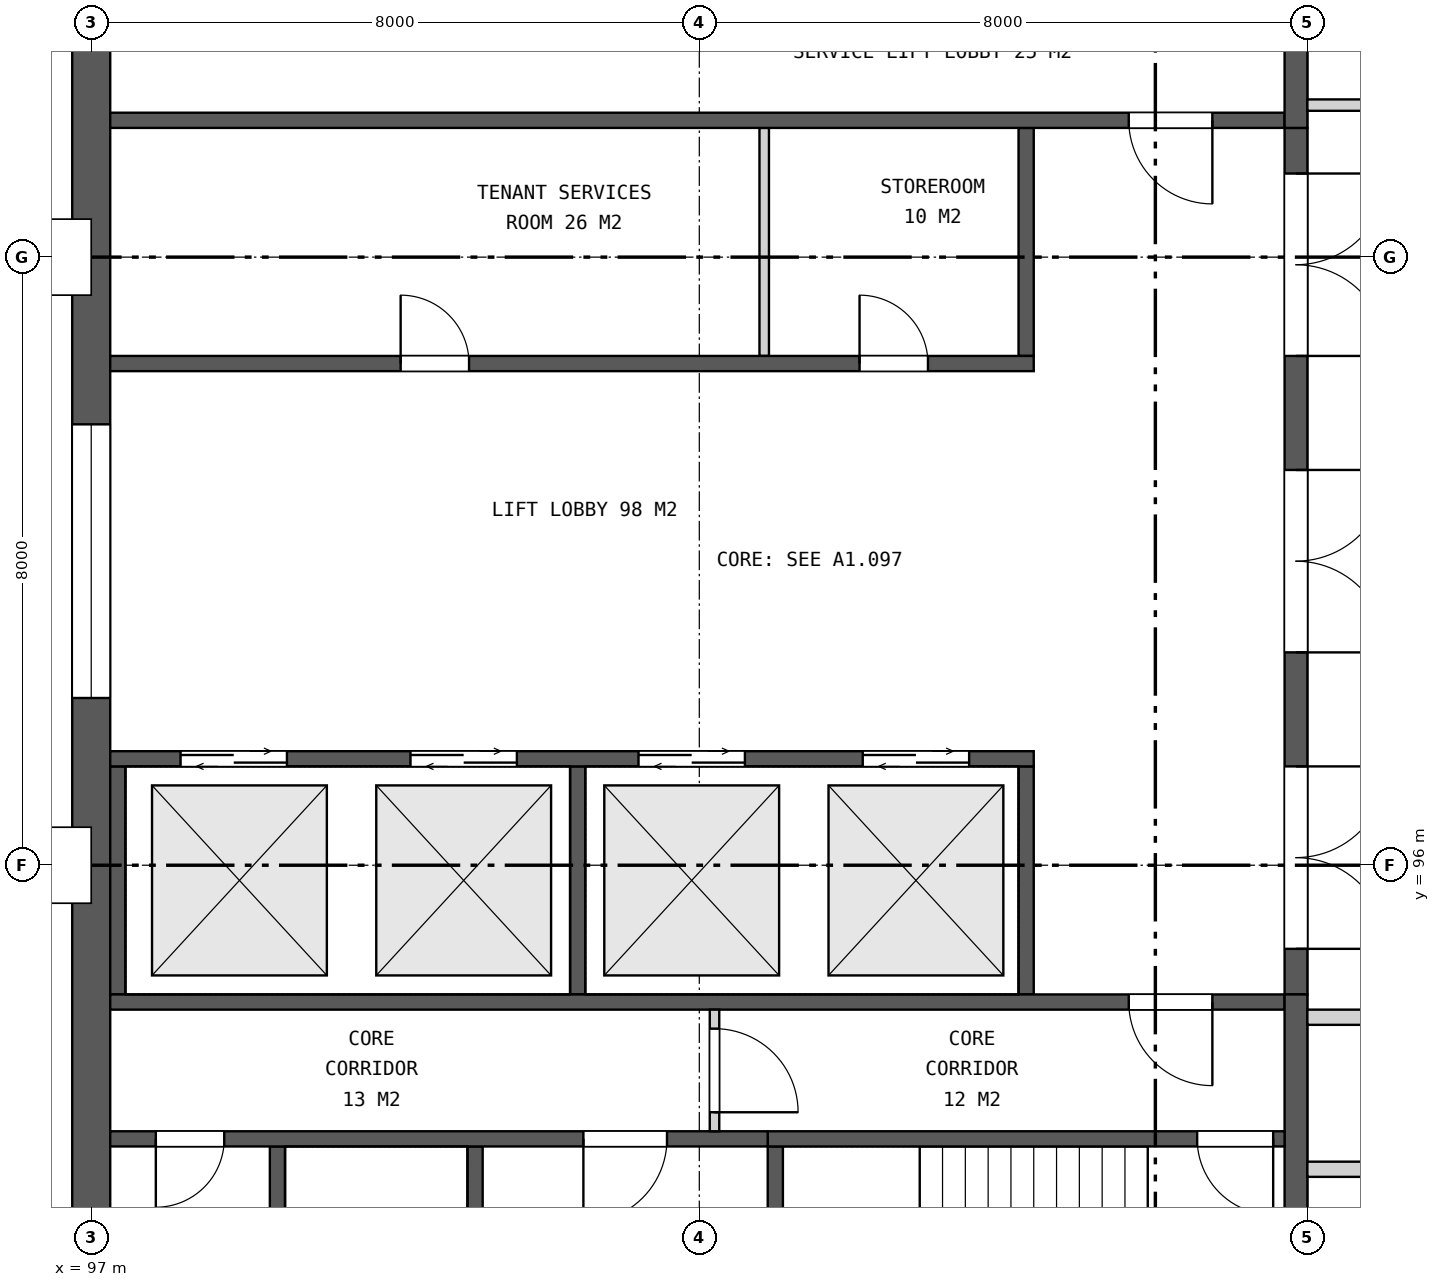
"""IFC4 building model, lengths in metres.
Left out: names, types, materials, properties, quantities, classifications, styles, units other than length and angle.
Written with IfcOpenShell. Run it as: python <this file> out.ifc"""

import sys

from ifc_helpers import new_model, si_unit, direction, frame, frame_2d, origin, place, context, subcontext, project, spatial, rectangle, extrude, element, fill, save


model = new_model("IFC4")
c1 = context("Model", 3, precision=1e-05, world=origin(), true_north=direction((0.0, 1.0)))
c2 = subcontext(c1, "Body", "Model", "MODEL_VIEW")
j1 = project(units=[si_unit("LENGTHUNIT", "METRE"), si_unit("PLANEANGLEUNIT", "RADIAN")], contexts=[c1])
p1 = place(None, origin())
s1 = spatial("IfcSite", under=j1, at=p1, CompositionType="ELEMENT")
p2 = place(p1, origin())
s2 = spatial("IfcBuilding", under=s1, at=p2, CompositionType="ELEMENT")
p3 = place(p2, frame((0.0, 0.0, 245.1)))
s3 = spatial("IfcBuildingStorey", under=s2, at=p3, CompositionType="ELEMENT", Elevation=245.1)
p4 = place(p3, frame((97.0, 111.75, 0.0), z_axis=(0.0, 0.0, 1.0), x_axis=(0.0, -1.0, 0.0)))
e1 = element("IfcWall", 1, at=p4, inside=s3, PredefinedType="SHEAR", context=c2, shape_type="SweptSolid", body=[
    extrude(rectangle(XDim=23.5, YDim=0.5, at=frame_2d((11.75, 0.0))), origin(), (0.0, 0.0, 1.0), 4.2),
])
p5 = place(p4, frame((9.95, 0.0, 0.15)))
e2 = element("IfcOpeningElement", 2, at=p5, cuts=e1, PredefinedType="OPENING", context=c2, shape_type="SweptSolid", body=[
    extrude(rectangle(XDim=3.6, YDim=3.0, at=frame_2d((1.8, 1.5))), frame((0.0, 0.26, 0.0), z_axis=(0.0, -1.0, 0.0), x_axis=(1.0, 0.0, 0.0)), (0.0, 0.0, 1.0), 0.52),
])
p6 = place(p3, frame((112.85, 105.7, 0.0), z_axis=(0.0, 0.0, 1.0), x_axis=(0.0, -1.0, 0.0)))
e3 = element("IfcWall", 3, at=p6, inside=s3, PredefinedType="SHEAR", context=c2, shape_type="SweptSolid", body=[
    extrude(rectangle(XDim=11.4, YDim=0.3, at=frame_2d((5.7, 0.0))), origin(), (0.0, 0.0, 1.0), 4.2),
])
p7 = place(p6, frame((0.6, 0.0, 0.0)))
e4 = element("IfcOpeningElement", 4, at=p7, cuts=e3, PredefinedType="OPENING", context=c2, shape_type="SweptSolid", body=[
    extrude(rectangle(XDim=2.4, YDim=2.4, at=frame_2d((1.2, 1.2))), frame((0.0, 0.16, 0.0), z_axis=(0.0, -1.0, 0.0), x_axis=(1.0, 0.0, 0.0)), (0.0, 0.0, 1.0), 0.32),
])
p8 = place(p6, frame((4.5, 0.0, 0.0)))
e5 = element("IfcOpeningElement", 5, at=p8, cuts=e3, PredefinedType="OPENING", context=c2, shape_type="SweptSolid", body=[
    extrude(rectangle(XDim=2.4, YDim=2.4, at=frame_2d((1.2, 1.2))), frame((0.0, 0.16, 0.0), z_axis=(0.0, -1.0, 0.0), x_axis=(1.0, 0.0, 0.0)), (0.0, 0.0, 1.0), 0.32),
])
p9 = place(p6, frame((8.4, 0.0, 0.0)))
e6 = element("IfcOpeningElement", 6, at=p9, cuts=e3, PredefinedType="OPENING", context=c2, shape_type="SweptSolid", body=[
    extrude(rectangle(XDim=2.4, YDim=2.4, at=frame_2d((1.2, 1.2))), frame((0.0, 0.16, 0.0), z_axis=(0.0, -1.0, 0.0), x_axis=(1.0, 0.0, 0.0)), (0.0, 0.0, 1.0), 0.32),
])
for number, where, z_axis, x_axis in (
    (7, (109.3, 97.3, 0.0), (0.0, 0.0, 1.0), (0.0, -1.0, 0.0)),
    (8, (103.4, 97.3, 0.0), (0.0, 0.0, 1.0), (0.0, -1.0, 0.0)),
    (9, (97.35, 97.3, 0.0), (0.0, 0.0, 1.0), (0.0, -1.0, 0.0)),
):
    element("IfcWall", number, at=place(p3, frame(where, z_axis=z_axis, x_axis=x_axis)), inside=s3, PredefinedType="SHEAR", context=c2, shape_type="SweptSolid", body=[
        extrude(rectangle(XDim=3.0, YDim=0.2, at=frame_2d((1.5, 0.0))), origin(), (0.0, 0.0, 1.0), 4.2),
    ])
p10 = place(p3, frame((109.4, 97.4, 0.0), z_axis=(0.0, 0.0, 1.0), x_axis=(-1.0, 0.0, 0.0)))
e10 = element("IfcWall", 10, at=p10, inside=s3, PredefinedType="SHEAR", context=c2, shape_type="SweptSolid", body=[
    extrude(rectangle(XDim=12.15, YDim=0.2, at=frame_2d((6.075, 0.0))), origin(), (0.0, 0.0, 1.0), 4.2),
])
p11 = place(p10, frame((0.85, 0.0, 0.0)))
e11 = element("IfcOpeningElement", 11, at=p11, cuts=e10, PredefinedType="OPENING", context=c2, shape_type="SweptSolid", body=[
    extrude(rectangle(XDim=1.4, YDim=2.1, at=frame_2d((0.7, 1.05))), frame((0.0, 0.11, 0.0), z_axis=(0.0, -1.0, 0.0), x_axis=(1.0, 0.0, 0.0)), (0.0, 0.0, 1.0), 0.22),
])
p12 = place(p10, frame((3.8, 0.0, 0.0)))
e12 = element("IfcOpeningElement", 12, at=p12, cuts=e10, PredefinedType="OPENING", context=c2, shape_type="SweptSolid", body=[
    extrude(rectangle(XDim=1.4, YDim=2.1, at=frame_2d((0.7, 1.05))), frame((0.0, 0.11, 0.0), z_axis=(0.0, -1.0, 0.0), x_axis=(1.0, 0.0, 0.0)), (0.0, 0.0, 1.0), 0.22),
])
p13 = place(p10, frame((6.8, 0.0, 0.0)))
e13 = element("IfcOpeningElement", 13, at=p13, cuts=e10, PredefinedType="OPENING", context=c2, shape_type="SweptSolid", body=[
    extrude(rectangle(XDim=1.4, YDim=2.1, at=frame_2d((0.7, 1.05))), frame((0.0, 0.11, 0.0), z_axis=(0.0, -1.0, 0.0), x_axis=(1.0, 0.0, 0.0)), (0.0, 0.0, 1.0), 0.22),
])
p14 = place(p10, frame((9.825, 0.0, 0.0)))
e14 = element("IfcOpeningElement", 14, at=p14, cuts=e10, PredefinedType="OPENING", context=c2, shape_type="SweptSolid", body=[
    extrude(rectangle(XDim=1.4, YDim=2.1, at=frame_2d((0.7, 1.05))), frame((0.0, 0.11, 0.0), z_axis=(0.0, -1.0, 0.0), x_axis=(1.0, 0.0, 0.0)), (0.0, 0.0, 1.0), 0.22),
])
p15 = place(p3, frame((109.3, 105.7, 0.0), z_axis=(0.0, 0.0, 1.0), x_axis=(0.0, -1.0, 0.0)))
e15 = element("IfcWall", 15, at=p15, inside=s3, PredefinedType="SHEAR", context=c2, shape_type="SweptSolid", body=[
    extrude(rectangle(XDim=3.0, YDim=0.2, at=frame_2d((1.5, 0.0))), origin(), (0.0, 0.0, 1.0), 4.2),
])
p16 = place(p3, frame((105.854, 105.7, 0.0), z_axis=(0.0, 0.0, 1.0), x_axis=(0.0, -1.0, 0.0)))
e16 = element("IfcWall", 16, at=p16, inside=s3, PredefinedType="PARTITIONING", context=c2, shape_type="SweptSolid", body=[
    extrude(rectangle(XDim=3.0, YDim=0.125, at=frame_2d((1.5, 0.0))), origin(), (0.0, 0.0, 1.0), 4.2),
])
p17 = place(p3, frame((109.4, 102.6, 0.0), z_axis=(0.0, 0.0, 1.0), x_axis=(-1.0, 0.0, 0.0)))
e17 = element("IfcWall", 17, at=p17, inside=s3, PredefinedType="SHEAR", context=c2, shape_type="SweptSolid", body=[
    extrude(rectangle(XDim=12.15, YDim=0.2, at=frame_2d((6.075, 0.0))), origin(), (0.0, 0.0, 1.0), 4.2),
])
p18 = place(p17, frame((1.392, 0.0, 0.0)))
e18 = element("IfcOpeningElement", 18, at=p18, cuts=e17, PredefinedType="OPENING", context=c2, shape_type="SweptSolid", body=[
    extrude(rectangle(XDim=0.9, YDim=2.1, at=frame_2d((0.45, 1.05))), frame((0.0, 0.11, 0.0), z_axis=(0.0, -1.0, 0.0), x_axis=(1.0, 0.0, 0.0)), (0.0, 0.0, 1.0), 0.22),
])
p19 = place(p17, frame((7.429, 0.0, 0.0)))
e19 = element("IfcOpeningElement", 19, at=p19, cuts=e17, PredefinedType="OPENING", context=c2, shape_type="SweptSolid", body=[
    extrude(rectangle(XDim=0.9, YDim=2.1, at=frame_2d((0.45, 1.05))), frame((0.0, 0.11, 0.0), z_axis=(0.0, -1.0, 0.0), x_axis=(1.0, 0.0, 0.0)), (0.0, 0.0, 1.0), 0.22),
])
p20 = place(p3, frame((112.7, 94.2, 0.0), z_axis=(0.0, 0.0, 1.0), x_axis=(-1.0, 0.0, 0.0)))
e20 = element("IfcWall", 20, at=p20, inside=s3, PredefinedType="SHEAR", context=c2, shape_type="SweptSolid", body=[
    extrude(rectangle(XDim=15.45, YDim=0.2, at=frame_2d((7.725, 0.0))), origin(), (0.0, 0.0, 1.0), 4.2),
])
p21 = place(p20, frame((0.95, 0.0, 0.0)))
e21 = element("IfcOpeningElement", 21, at=p21, cuts=e20, PredefinedType="OPENING", context=c2, shape_type="SweptSolid", body=[
    extrude(rectangle(XDim=1.1, YDim=2.1, at=frame_2d((0.55, 1.05))), frame((0.0, 0.11, 0.0), z_axis=(0.0, -1.0, 0.0), x_axis=(1.0, 0.0, 0.0)), (0.0, 0.0, 1.0), 0.22),
])
p22 = place(p3, frame((112.85, 94.3, 0.0), z_axis=(0.0, 0.0, 1.0), x_axis=(0.0, -1.0, 0.0)))
e22 = element("IfcWall", 22, at=p22, inside=s3, PredefinedType="SHEAR", context=c2, shape_type="SweptSolid", body=[
    extrude(rectangle(XDim=6.05, YDim=0.3, at=frame_2d((3.025, 0.0))), origin(), (0.0, 0.0, 1.0), 4.2),
])
p23 = place(p3, frame((106.0, 92.3, 0.0), z_axis=(0.0, 0.0, 1.0), x_axis=(0.0, -1.0, 0.0)))
e23 = element("IfcWall", 23, at=p23, inside=s3, PredefinedType="SHEAR", context=c2, shape_type="SweptSolid", body=[
    extrude(rectangle(XDim=4.05, YDim=0.2, at=frame_2d((2.025, 0.0))), origin(), (0.0, 0.0, 1.0), 4.2),
])
p24 = place(p3, frame((102.05, 92.3, 0.0), z_axis=(0.0, 0.0, 1.0), x_axis=(0.0, -1.0, 0.0)))
e24 = element("IfcWall", 24, at=p24, inside=s3, PredefinedType="SHEAR", context=c2, shape_type="SweptSolid", body=[
    extrude(rectangle(XDim=4.05, YDim=0.2, at=frame_2d((2.025, 0.0))), origin(), (0.0, 0.0, 1.0), 4.2),
])
p25 = place(p24, frame((1.425, 0.0, 0.0)))
e25 = element("IfcOpeningElement", 25, at=p25, cuts=e24, PredefinedType="OPENING", context=c2, shape_type="SweptSolid", body=[
    extrude(rectangle(XDim=1.2, YDim=2.1, at=frame_2d((0.6, 1.05))), frame((0.0, 0.11, 0.0), z_axis=(0.0, -1.0, 0.0), x_axis=(1.0, 0.0, 0.0)), (0.0, 0.0, 1.0), 0.22),
])
p26 = place(p3, frame((99.45, 92.3, 0.0), z_axis=(0.0, 0.0, 1.0), x_axis=(0.0, -1.0, 0.0)))
e26 = element("IfcWall", 26, at=p26, inside=s3, PredefinedType="SHEAR", context=c2, shape_type="SweptSolid", body=[
    extrude(rectangle(XDim=4.05, YDim=0.2, at=frame_2d((2.025, 0.0))), origin(), (0.0, 0.0, 1.0), 4.2),
])
p27 = place(p3, frame((112.7, 92.4, 0.0), z_axis=(0.0, 0.0, 1.0), x_axis=(-1.0, 0.0, 0.0)))
e27 = element("IfcWall", 27, at=p27, inside=s3, PredefinedType="SHEAR", context=c2, shape_type="SweptSolid", body=[
    extrude(rectangle(XDim=6.8, YDim=0.2, at=frame_2d((3.4, 0.0))), origin(), (0.0, 0.0, 1.0), 4.2),
])
p28 = place(p27, frame((0.15, 0.0, 0.0)))
e28 = element("IfcOpeningElement", 28, at=p28, cuts=e27, PredefinedType="OPENING", context=c2, shape_type="SweptSolid", body=[
    extrude(rectangle(XDim=1.0, YDim=2.1, at=frame_2d((0.5, 1.05))), frame((0.0, 0.11, 0.0), z_axis=(0.0, -1.0, 0.0), x_axis=(1.0, 0.0, 0.0)), (0.0, 0.0, 1.0), 0.22),
])
p29 = place(p3, frame((105.9, 92.4, 0.0), z_axis=(0.0, 0.0, 1.0), x_axis=(-1.0, 0.0, 0.0)))
e29 = element("IfcWall", 29, at=p29, inside=s3, PredefinedType="SHEAR", context=c2, shape_type="SweptSolid", body=[
    extrude(rectangle(XDim=8.65, YDim=0.2, at=frame_2d((4.325, 0.0))), origin(), (0.0, 0.0, 1.0), 4.2),
])
p30 = place(p29, frame((1.325, 0.0, 0.0)))
e30 = element("IfcOpeningElement", 30, at=p30, cuts=e29, PredefinedType="OPENING", context=c2, shape_type="SweptSolid", body=[
    extrude(rectangle(XDim=1.1, YDim=2.1, at=frame_2d((0.55, 1.05))), frame((0.0, 0.11, 0.0), z_axis=(0.0, -1.0, 0.0), x_axis=(1.0, 0.0, 0.0)), (0.0, 0.0, 1.0), 0.22),
])
p31 = place(p29, frame((7.15, 0.0, 0.0)))
e31 = element("IfcOpeningElement", 31, at=p31, cuts=e29, PredefinedType="OPENING", context=c2, shape_type="SweptSolid", body=[
    extrude(rectangle(XDim=0.9, YDim=2.1, at=frame_2d((0.45, 1.05))), frame((0.0, 0.11, 0.0), z_axis=(0.0, -1.0, 0.0), x_axis=(1.0, 0.0, 0.0)), (0.0, 0.0, 1.0), 0.22),
])
p32 = place(p3, frame((105.2, 94.1, 0.0), z_axis=(0.0, 0.0, 1.0), x_axis=(0.0, -1.0, 0.0)))
e32 = element("IfcWall", 32, at=p32, inside=s3, PredefinedType="PARTITIONING", context=c2, shape_type="SweptSolid", body=[
    extrude(rectangle(XDim=1.6, YDim=0.125, at=frame_2d((0.8, 0.0))), origin(), (0.0, 0.0, 1.0), 4.2),
])
p33 = place(p32, frame((0.25, 0.0, 0.0)))
e33 = element("IfcOpeningElement", 33, at=p33, cuts=e32, PredefinedType="OPENING", context=c2, shape_type="SweptSolid", body=[
    extrude(rectangle(XDim=1.1, YDim=2.1, at=frame_2d((0.55, 1.05))), frame((0.0, 0.073, 0.0), z_axis=(0.0, -1.0, 0.0), x_axis=(1.0, 0.0, 0.0)), (0.0, 0.0, 1.0), 0.145),
])
p34 = place(p3, frame((112.7, 105.8, 0.0), z_axis=(0.0, 0.0, 1.0), x_axis=(-1.0, 0.0, 0.0)))
e34 = element("IfcWall", 34, at=p34, inside=s3, PredefinedType="SHEAR", context=c2, shape_type="SweptSolid", body=[
    extrude(rectangle(XDim=15.45, YDim=0.2, at=frame_2d((7.725, 0.0))), origin(), (0.0, 0.0, 1.0), 4.2),
])
p35 = place(p34, frame((0.95, 0.0, 0.0)))
e35 = element("IfcOpeningElement", 35, at=p35, cuts=e34, PredefinedType="OPENING", context=c2, shape_type="SweptSolid", body=[
    extrude(rectangle(XDim=1.1, YDim=2.1, at=frame_2d((0.55, 1.05))), frame((0.0, 0.11, 0.0), z_axis=(0.0, -1.0, 0.0), x_axis=(1.0, 0.0, 0.0)), (0.0, 0.0, 1.0), 0.22),
])
p36 = place(p3, frame((112.85, 111.75, 0.0), z_axis=(0.0, 0.0, 1.0), x_axis=(0.0, -1.0, 0.0)))
e36 = element("IfcWall", 36, at=p36, inside=s3, PredefinedType="SHEAR", context=c2, shape_type="SweptSolid", body=[
    extrude(rectangle(XDim=6.05, YDim=0.3, at=frame_2d((3.025, 0.0))), origin(), (0.0, 0.0, 1.0), 4.2),
])
for number, where, z_axis, x_axis in (
    (37, (113.0, 92.0, 0.0), (0.0, 0.0, 1.0), (1.0, 0.0, 0.0)),
    (38, (113.0, 94.0, 0.0), (0.0, 0.0, 1.0), (1.0, 0.0, 0.0)),
):
    element("IfcWall", number, at=place(p3, frame(where, z_axis=z_axis, x_axis=x_axis)), inside=s3, PredefinedType="SOLIDWALL", context=c2, shape_type="SweptSolid", body=[
        extrude(rectangle(XDim=5.5, YDim=0.2, at=frame_2d((2.75, 0.0))), origin(), (0.0, 0.0, 1.0), 3.443),
    ])
p37 = place(p3, frame((113.0, 106.0, 0.0), z_axis=(0.0, 0.0, 1.0), x_axis=(1.0, 0.0, 0.0)))
e39 = element("IfcWall", 39, at=p37, inside=s3, PredefinedType="PARTITIONING", context=c2, shape_type="SweptSolid", body=[
    extrude(rectangle(XDim=5.5, YDim=0.15, at=frame_2d((2.75, 0.0))), origin(), (0.0, 0.0, 1.0), 3.443),
])
p38 = place(p5, origin())
e40 = element("IfcWindow", 40, at=p38, inside=s3, PartitioningType="SINGLE_PANEL", PredefinedType="WINDOW", context=c2, shape_type="SweptSolid", body=[
    extrude(rectangle(XDim=3.6, YDim=3.0, at=frame_2d((1.8, 1.5))), frame((0.0, 0.03, 0.0), z_axis=(0.0, -1.0, 0.0), x_axis=(1.0, 0.0, 0.0)), (0.0, 0.0, 1.0), 0.06),
])
fill(e2, e40)
p39 = place(p7, origin())
e41 = element("IfcDoor", 41, at=p39, inside=s3, OperationType="DOUBLE_DOOR_SINGLE_SWING", PredefinedType="DOOR", context=c2, shape_type="SweptSolid", body=[
    extrude(rectangle(XDim=2.4, YDim=2.4, at=frame_2d((1.2, 1.2))), frame((0.0, 0.025, 0.0), z_axis=(0.0, -1.0, 0.0), x_axis=(1.0, 0.0, 0.0)), (0.0, 0.0, 1.0), 0.05),
])
fill(e4, e41)
p40 = place(p8, origin())
e42 = element("IfcDoor", 42, at=p40, inside=s3, OperationType="DOUBLE_DOOR_SINGLE_SWING", PredefinedType="DOOR", context=c2, shape_type="SweptSolid", body=[
    extrude(rectangle(XDim=2.4, YDim=2.4, at=frame_2d((1.2, 1.2))), frame((0.0, 0.025, 0.0), z_axis=(0.0, -1.0, 0.0), x_axis=(1.0, 0.0, 0.0)), (0.0, 0.0, 1.0), 0.05),
])
fill(e5, e42)
p41 = place(p9, origin())
e43 = element("IfcDoor", 43, at=p41, inside=s3, OperationType="DOUBLE_DOOR_SINGLE_SWING", PredefinedType="DOOR", context=c2, shape_type="SweptSolid", body=[
    extrude(rectangle(XDim=2.4, YDim=2.4, at=frame_2d((1.2, 1.2))), frame((0.0, 0.025, 0.0), z_axis=(0.0, -1.0, 0.0), x_axis=(1.0, 0.0, 0.0)), (0.0, 0.0, 1.0), 0.05),
])
fill(e6, e43)
p42 = place(p11, origin())
e44 = element("IfcDoor", 44, at=p42, inside=s3, OperationType="DOUBLE_DOOR_SLIDING", PredefinedType="DOOR", context=c2, shape_type="SweptSolid", body=[
    extrude(rectangle(XDim=1.4, YDim=2.1, at=frame_2d((0.7, 1.05))), frame((0.0, 0.025, 0.0), z_axis=(0.0, -1.0, 0.0), x_axis=(1.0, 0.0, 0.0)), (0.0, 0.0, 1.0), 0.05),
])
fill(e11, e44)
p43 = place(p12, origin())
e45 = element("IfcDoor", 45, at=p43, inside=s3, OperationType="DOUBLE_DOOR_SLIDING", PredefinedType="DOOR", context=c2, shape_type="SweptSolid", body=[
    extrude(rectangle(XDim=1.4, YDim=2.1, at=frame_2d((0.7, 1.05))), frame((0.0, 0.025, 0.0), z_axis=(0.0, -1.0, 0.0), x_axis=(1.0, 0.0, 0.0)), (0.0, 0.0, 1.0), 0.05),
])
fill(e12, e45)
p44 = place(p13, origin())
e46 = element("IfcDoor", 46, at=p44, inside=s3, OperationType="DOUBLE_DOOR_SLIDING", PredefinedType="DOOR", context=c2, shape_type="SweptSolid", body=[
    extrude(rectangle(XDim=1.4, YDim=2.1, at=frame_2d((0.7, 1.05))), frame((0.0, 0.025, 0.0), z_axis=(0.0, -1.0, 0.0), x_axis=(1.0, 0.0, 0.0)), (0.0, 0.0, 1.0), 0.05),
])
fill(e13, e46)
p45 = place(p14, origin())
e47 = element("IfcDoor", 47, at=p45, inside=s3, OperationType="DOUBLE_DOOR_SLIDING", PredefinedType="DOOR", context=c2, shape_type="SweptSolid", body=[
    extrude(rectangle(XDim=1.4, YDim=2.1, at=frame_2d((0.7, 1.05))), frame((0.0, 0.025, 0.0), z_axis=(0.0, -1.0, 0.0), x_axis=(1.0, 0.0, 0.0)), (0.0, 0.0, 1.0), 0.05),
])
fill(e14, e47)
p46 = place(p18, frame((0.9, 0.0, 0.0), z_axis=(0.0, 0.0, 1.0), x_axis=(-1.0, 0.0, 0.0)))
e48 = element("IfcDoor", 48, at=p46, inside=s3, OperationType="SINGLE_SWING_LEFT", PredefinedType="DOOR", context=c2, shape_type="SweptSolid", body=[
    extrude(rectangle(XDim=0.9, YDim=2.1, at=frame_2d((0.45, 1.05))), frame((0.0, 0.025, 0.0), z_axis=(0.0, -1.0, 0.0), x_axis=(1.0, 0.0, 0.0)), (0.0, 0.0, 1.0), 0.05),
])
fill(e18, e48)
p47 = place(p19, frame((0.9, 0.0, 0.0), z_axis=(0.0, 0.0, 1.0), x_axis=(-1.0, 0.0, 0.0)))
e49 = element("IfcDoor", 49, at=p47, inside=s3, OperationType="SINGLE_SWING_LEFT", PredefinedType="DOOR", context=c2, shape_type="SweptSolid", body=[
    extrude(rectangle(XDim=0.9, YDim=2.1, at=frame_2d((0.45, 1.05))), frame((0.0, 0.025, 0.0), z_axis=(0.0, -1.0, 0.0), x_axis=(1.0, 0.0, 0.0)), (0.0, 0.0, 1.0), 0.05),
])
fill(e19, e49)
p48 = place(p21, origin())
e50 = element("IfcDoor", 50, at=p48, inside=s3, OperationType="SINGLE_SWING_LEFT", PredefinedType="DOOR", context=c2, shape_type="SweptSolid", body=[
    extrude(rectangle(XDim=1.1, YDim=2.1, at=frame_2d((0.55, 1.05))), frame((0.0, 0.025, 0.0), z_axis=(0.0, -1.0, 0.0), x_axis=(1.0, 0.0, 0.0)), (0.0, 0.0, 1.0), 0.05),
])
fill(e21, e50)
p49 = place(p28, origin())
e51 = element("IfcDoor", 51, at=p49, inside=s3, OperationType="SINGLE_SWING_LEFT", PredefinedType="DOOR", context=c2, shape_type="SweptSolid", body=[
    extrude(rectangle(XDim=1.0, YDim=2.1, at=frame_2d((0.5, 1.05))), frame((0.0, 0.025, 0.0), z_axis=(0.0, -1.0, 0.0), x_axis=(1.0, 0.0, 0.0)), (0.0, 0.0, 1.0), 0.05),
])
fill(e28, e51)
p50 = place(p30, origin())
e52 = element("IfcDoor", 52, at=p50, inside=s3, OperationType="SINGLE_SWING_RIGHT", PredefinedType="DOOR", context=c2, shape_type="SweptSolid", body=[
    extrude(rectangle(XDim=1.1, YDim=2.1, at=frame_2d((0.55, 1.05))), frame((0.0, 0.025, 0.0), z_axis=(0.0, -1.0, 0.0), x_axis=(1.0, 0.0, 0.0)), (0.0, 0.0, 1.0), 0.05),
])
fill(e30, e52)
p51 = place(p31, origin())
e53 = element("IfcDoor", 53, at=p51, inside=s3, OperationType="SINGLE_SWING_RIGHT", PredefinedType="DOOR", context=c2, shape_type="SweptSolid", body=[
    extrude(rectangle(XDim=0.9, YDim=2.1, at=frame_2d((0.45, 1.05))), frame((0.0, 0.025, 0.0), z_axis=(0.0, -1.0, 0.0), x_axis=(1.0, 0.0, 0.0)), (0.0, 0.0, 1.0), 0.05),
])
fill(e31, e53)
p52 = place(p33, origin())
e54 = element("IfcDoor", 54, at=p52, inside=s3, OperationType="SINGLE_SWING_RIGHT", PredefinedType="DOOR", context=c2, shape_type="SweptSolid", body=[
    extrude(rectangle(XDim=1.1, YDim=2.1, at=frame_2d((0.55, 1.05))), frame((0.0, 0.025, 0.0), z_axis=(0.0, -1.0, 0.0), x_axis=(1.0, 0.0, 0.0)), (0.0, 0.0, 1.0), 0.05),
])
fill(e33, e54)
p53 = place(p35, origin())
e55 = element("IfcDoor", 55, at=p53, inside=s3, OperationType="SINGLE_SWING_LEFT", PredefinedType="DOOR", context=c2, shape_type="SweptSolid", body=[
    extrude(rectangle(XDim=1.1, YDim=2.1, at=frame_2d((0.55, 1.05))), frame((0.0, 0.025, 0.0), z_axis=(0.0, -1.0, 0.0), x_axis=(1.0, 0.0, 0.0)), (0.0, 0.0, 1.0), 0.05),
])
fill(e35, e55)
save(model, sys.argv[1])
